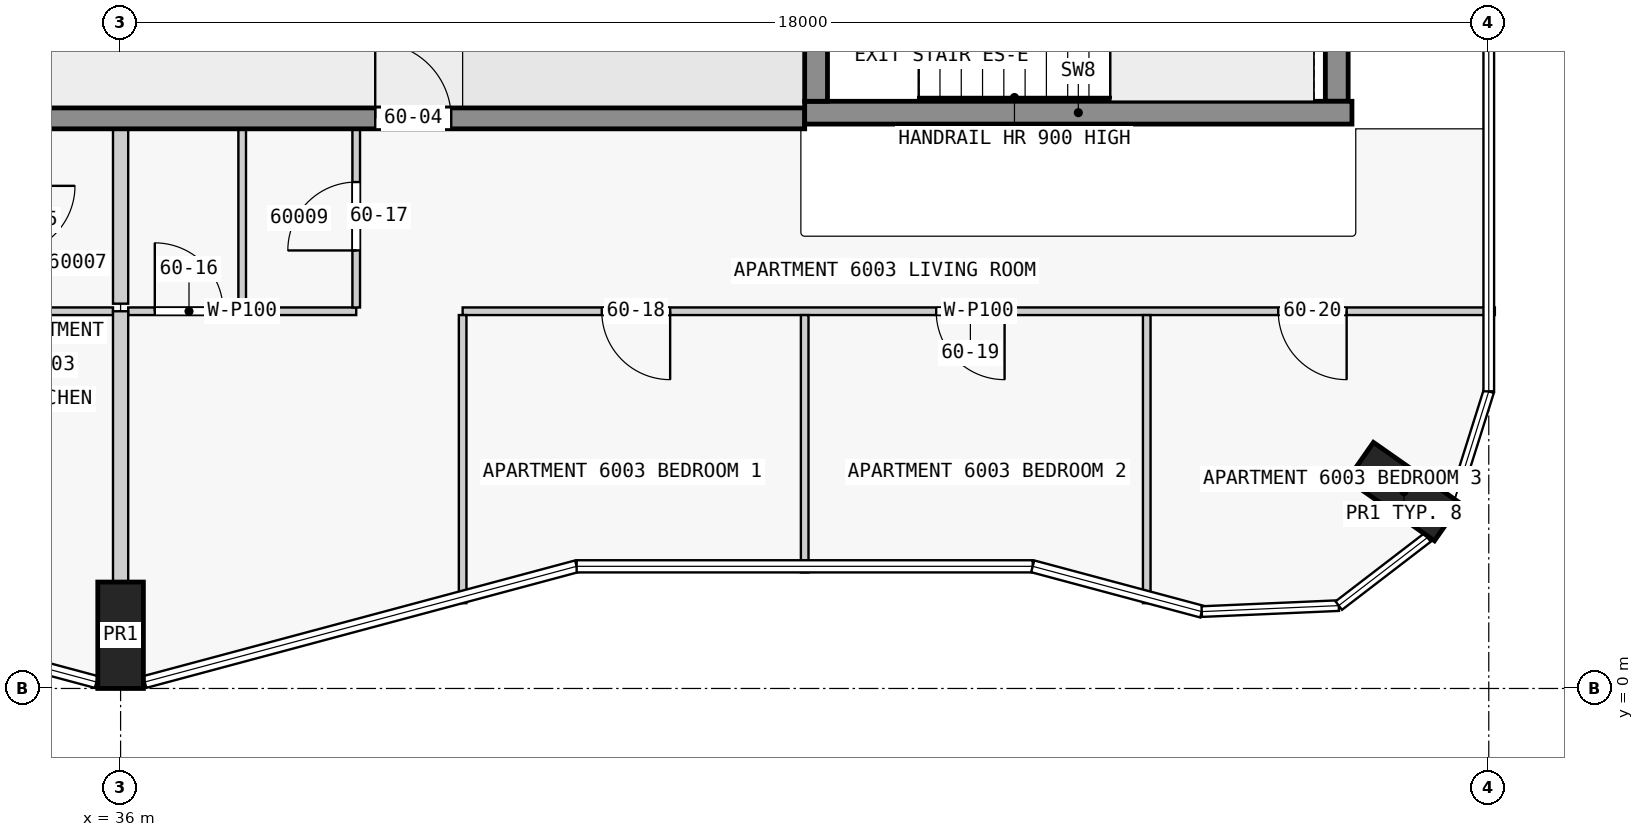
"""IFC4 building model, lengths in metres.
Left out: names, types, materials, properties, quantities, classifications, styles, units other than length and angle.
Written with IfcOpenShell. Run it as: python <this file> out.ifc"""

import sys

from ifc_helpers import new_model, si_unit, direction, frame, frame_2d, origin, origin_2d, place, context, subcontext, project, spatial, rectangle, extrude, element, fill, save


model = new_model("IFC4")
c1 = context("Model", 3, precision=1e-05, world=origin(), true_north=direction((0.0, 1.0)))
c2 = subcontext(c1, "Body", "Model", "MODEL_VIEW")
j1 = project(units=[si_unit("LENGTHUNIT", "METRE"), si_unit("PLANEANGLEUNIT", "RADIAN")], contexts=[c1])
p1 = place(None, origin())
s1 = spatial("IfcSite", under=j1, at=p1, CompositionType="ELEMENT")
p2 = place(p1, origin())
s2 = spatial("IfcBuilding", under=s1, at=p2, CompositionType="ELEMENT")
p3 = place(p2, frame((0.0, 0.0, 229.4)))
s3 = spatial("IfcBuildingStorey", under=s2, at=p3, CompositionType="ELEMENT", Elevation=229.4)
for number, where, z_axis, x_axis in (
    (1, (36.0, 0.7, 0.0), (0.0, 0.0, 1.0), (1.0, 0.0, 0.0)),
    (2, (52.884, 2.59, 0.0), (0.0, 0.0, 1.0), (0.574, 0.819, 0.0)),
):
    element("IfcColumn", number, at=place(p3, frame(where, z_axis=z_axis, x_axis=x_axis)), inside=s3, PredefinedType="COLUMN", context=c2, shape_type="SweptSolid", body=[
        extrude(rectangle(XDim=0.6, YDim=1.4, at=origin_2d()), origin(), (0.0, 0.0, 1.0), 3.5),
    ])
p4 = place(p3, frame((45.15, 7.725, 0.0), z_axis=(0.0, 0.0, 1.0), x_axis=(0.0, 1.0, 0.0)))
e3 = element("IfcWall", 3, at=p4, inside=s3, PredefinedType="SHEAR", context=c2, shape_type="SweptSolid", body=[
    extrude(rectangle(XDim=2.55, YDim=0.3, at=frame_2d((1.275, 0.0))), origin(), (0.0, 0.0, 1.0), 3.5),
])
p5 = place(p4, frame((0.725, 0.0, 0.0)))
e4 = element("IfcOpeningElement", 4, at=p5, cuts=e3, PredefinedType="OPENING", context=c2, shape_type="SweptSolid", body=[
    extrude(rectangle(XDim=1.1, YDim=2.1, at=frame_2d((0.55, 1.05))), frame((0.0, 0.16, 0.0), z_axis=(0.0, -1.0, 0.0), x_axis=(1.0, 0.0, 0.0)), (0.0, 0.0, 1.0), 0.32),
])
p6 = place(p3, frame((52.0, 7.725, 0.0), z_axis=(0.0, 0.0, 1.0), x_axis=(0.0, 1.0, 0.0)))
e5 = element("IfcWall", 5, at=p6, inside=s3, PredefinedType="SHEAR", context=c2, shape_type="SweptSolid", body=[
    extrude(rectangle(XDim=2.55, YDim=0.3, at=frame_2d((1.275, 0.0))), origin(), (0.0, 0.0, 1.0), 3.5),
])
p7 = place(p3, frame((45.0, 7.575, 0.0), z_axis=(0.0, 0.0, 1.0), x_axis=(1.0, 0.0, 0.0)))
e6 = element("IfcWall", 6, at=p7, inside=s3, PredefinedType="SHEAR", context=c2, shape_type="SweptSolid", body=[
    extrude(rectangle(XDim=7.2, YDim=0.3, at=frame_2d((3.6, 0.0))), origin(), (0.0, 0.0, 1.0), 3.5),
])
p8 = place(p3, frame((22.5, 7.5, 0.0), z_axis=(0.0, 0.0, 1.0), x_axis=(1.0, 0.0, 0.0)))
e7 = element("IfcWall", 7, at=p8, inside=s3, PredefinedType="SHEAR", context=c2, shape_type="SweptSolid", body=[
    extrude(rectangle(XDim=22.5, YDim=0.275, at=frame_2d((11.25, 0.0))), origin(), (0.0, 0.0, 1.0), 3.25),
])
p9 = place(p8, frame((1.75, 0.0, 0.0)))
e8 = element("IfcOpeningElement", 8, at=p9, cuts=e7, PredefinedType="OPENING", context=c2, shape_type="SweptSolid", body=[
    extrude(rectangle(XDim=1.0, YDim=2.1, at=frame_2d((0.5, 1.05))), frame((0.0, 0.147, 0.0), z_axis=(0.0, -1.0, 0.0), x_axis=(1.0, 0.0, 0.0)), (0.0, 0.0, 1.0), 0.295),
])
p10 = place(p8, frame((5.85, 0.0, 0.0)))
e9 = element("IfcOpeningElement", 9, at=p10, cuts=e7, PredefinedType="OPENING", context=c2, shape_type="SweptSolid", body=[
    extrude(rectangle(XDim=1.8, YDim=2.1, at=frame_2d((0.9, 1.05))), frame((0.0, 0.147, 0.0), z_axis=(0.0, -1.0, 0.0), x_axis=(1.0, 0.0, 0.0)), (0.0, 0.0, 1.0), 0.295),
])
p11 = place(p8, frame((10.75, 0.0, 0.0)))
e10 = element("IfcOpeningElement", 10, at=p11, cuts=e7, PredefinedType="OPENING", context=c2, shape_type="SweptSolid", body=[
    extrude(rectangle(XDim=1.0, YDim=2.1, at=frame_2d((0.5, 1.05))), frame((0.0, 0.147, 0.0), z_axis=(0.0, -1.0, 0.0), x_axis=(1.0, 0.0, 0.0)), (0.0, 0.0, 1.0), 0.295),
])
p12 = place(p8, frame((16.85, 0.0, 0.0)))
e11 = element("IfcOpeningElement", 11, at=p12, cuts=e7, PredefinedType="OPENING", context=c2, shape_type="SweptSolid", body=[
    extrude(rectangle(XDim=1.0, YDim=2.1, at=frame_2d((0.5, 1.05))), frame((0.0, 0.147, 0.0), z_axis=(0.0, -1.0, 0.0), x_axis=(1.0, 0.0, 0.0)), (0.0, 0.0, 1.0), 0.295),
])
p13 = place(p3, frame((54.08, 4.962, 0.0), z_axis=(0.0, 0.0, 1.0), x_axis=(-1.0, 0.0, 0.0)))
e12 = element("IfcWall", 12, at=p13, inside=s3, PredefinedType="PARTITIONING", context=c2, shape_type="SweptSolid", body=[
    extrude(rectangle(XDim=13.58, YDim=0.1, at=frame_2d((6.79, 0.0))), origin(), (0.0, 0.0, 1.0), 3.25),
])
p14 = place(p13, frame((10.85, 0.0, 0.0)))
e13 = element("IfcOpeningElement", 13, at=p14, cuts=e12, PredefinedType="OPENING", context=c2, shape_type="SweptSolid", body=[
    extrude(rectangle(XDim=0.9, YDim=2.1, at=frame_2d((0.45, 1.05))), frame((0.0, 0.06, 0.0), z_axis=(0.0, -1.0, 0.0), x_axis=(1.0, 0.0, 0.0)), (0.0, 0.0, 1.0), 0.12),
])
p15 = place(p13, frame((6.45, 0.0, 0.0)))
e14 = element("IfcOpeningElement", 14, at=p15, cuts=e12, PredefinedType="OPENING", context=c2, shape_type="SweptSolid", body=[
    extrude(rectangle(XDim=0.9, YDim=2.1, at=frame_2d((0.45, 1.05))), frame((0.0, 0.06, 0.0), z_axis=(0.0, -1.0, 0.0), x_axis=(1.0, 0.0, 0.0)), (0.0, 0.0, 1.0), 0.12),
])
p16 = place(p13, frame((1.95, 0.0, 0.0)))
e15 = element("IfcOpeningElement", 15, at=p16, cuts=e12, PredefinedType="OPENING", context=c2, shape_type="SweptSolid", body=[
    extrude(rectangle(XDim=0.9, YDim=2.1, at=frame_2d((0.45, 1.05))), frame((0.0, 0.06, 0.0), z_axis=(0.0, -1.0, 0.0), x_axis=(1.0, 0.0, 0.0)), (0.0, 0.0, 1.0), 0.12),
])
p17 = place(p3, frame((34.5, 4.962, 0.0), z_axis=(0.0, 0.0, 1.0), x_axis=(1.0, 0.0, 0.0)))
e16 = element("IfcWall", 16, at=p17, inside=s3, PredefinedType="PARTITIONING", context=c2, shape_type="SweptSolid", body=[
    extrude(rectangle(XDim=1.4, YDim=0.1, at=frame_2d((0.7, 0.0))), origin(), (0.0, 0.0, 1.0), 3.25),
])
p18 = place(p3, frame((36.1, 4.962, 0.0), z_axis=(0.0, 0.0, 1.0), x_axis=(1.0, 0.0, 0.0)))
e17 = element("IfcWall", 17, at=p18, inside=s3, PredefinedType="PARTITIONING", context=c2, shape_type="SweptSolid", body=[
    extrude(rectangle(XDim=3.0, YDim=0.1, at=frame_2d((1.5, 0.0))), origin(), (0.0, 0.0, 1.0), 3.25),
])
p19 = place(p18, frame((0.35, 0.0, 0.0)))
e18 = element("IfcOpeningElement", 18, at=p19, cuts=e17, PredefinedType="OPENING", context=c2, shape_type="SweptSolid", body=[
    extrude(rectangle(XDim=0.9, YDim=2.1, at=frame_2d((0.45, 1.05))), frame((0.0, 0.06, 0.0), z_axis=(0.0, -1.0, 0.0), x_axis=(1.0, 0.0, 0.0)), (0.0, 0.0, 1.0), 0.12),
])
p20 = place(p3, frame((36.0, 4.962, 0.0), z_axis=(0.0, 0.0, 1.0), x_axis=(0.0, -1.0, 0.0)))
e19 = element("IfcWall", 19, at=p20, inside=s3, PredefinedType="PARTITIONING", context=c2, shape_type="SweptSolid", body=[
    extrude(rectangle(XDim=3.562, YDim=0.2, at=frame_2d((1.781, 0.0))), origin(), (0.0, 0.0, 1.0), 3.25),
])
p21 = place(p3, frame((36.0, 5.062, 0.0), z_axis=(0.0, 0.0, 1.0), x_axis=(0.0, 1.0, 0.0)))
e20 = element("IfcWall", 20, at=p21, inside=s3, PredefinedType="PARTITIONING", context=c2, shape_type="SweptSolid", body=[
    extrude(rectangle(XDim=2.3, YDim=0.2, at=frame_2d((1.15, 0.0))), origin(), (0.0, 0.0, 1.0), 3.25),
])
p22 = place(p3, frame((37.6, 5.012, 0.0), z_axis=(0.0, 0.0, 1.0), x_axis=(0.0, 1.0, 0.0)))
e21 = element("IfcWall", 21, at=p22, inside=s3, PredefinedType="PARTITIONING", context=c2, shape_type="SweptSolid", body=[
    extrude(rectangle(XDim=2.35, YDim=0.1, at=frame_2d((1.175, 0.0))), origin(), (0.0, 0.0, 1.0), 3.25),
])
p23 = place(p3, frame((39.1, 5.012, 0.0), z_axis=(0.0, 0.0, 1.0), x_axis=(0.0, 1.0, 0.0)))
e22 = element("IfcWall", 22, at=p23, inside=s3, PredefinedType="PARTITIONING", context=c2, shape_type="SweptSolid", body=[
    extrude(rectangle(XDim=2.35, YDim=0.1, at=frame_2d((1.175, 0.0))), origin(), (0.0, 0.0, 1.0), 3.25),
])
p24 = place(p23, frame((0.75, 0.0, 0.0)))
e23 = element("IfcOpeningElement", 23, at=p24, cuts=e22, PredefinedType="OPENING", context=c2, shape_type="SweptSolid", body=[
    extrude(rectangle(XDim=0.9, YDim=2.1, at=frame_2d((0.45, 1.05))), frame((0.0, 0.06, 0.0), z_axis=(0.0, -1.0, 0.0), x_axis=(1.0, 0.0, 0.0)), (0.0, 0.0, 1.0), 0.12),
])
p25 = place(p3, frame((40.5, 4.913, 0.0), z_axis=(0.0, 0.0, 1.0), x_axis=(0.0, -1.0, 0.0)))
e24 = element("IfcWall", 24, at=p25, inside=s3, PredefinedType="PARTITIONING", context=c2, shape_type="SweptSolid", body=[
    extrude(rectangle(XDim=3.79, YDim=0.1, at=frame_2d((1.895, 0.0))), origin(), (0.0, 0.0, 1.0), 3.25),
])
p26 = place(p3, frame((45.0, 1.527, 0.0), z_axis=(0.0, 0.0, 1.0), x_axis=(0.0, 1.0, 0.0)))
e25 = element("IfcWall", 25, at=p26, inside=s3, PredefinedType="PARTITIONING", context=c2, shape_type="SweptSolid", body=[
    extrude(rectangle(XDim=3.386, YDim=0.1, at=frame_2d((1.693, 0.0))), origin(), (0.0, 0.0, 1.0), 3.25),
])
p27 = place(p3, frame((49.5, 1.122, 0.0), z_axis=(0.0, 0.0, 1.0), x_axis=(0.0, 1.0, 0.0)))
e26 = element("IfcWall", 26, at=p27, inside=s3, PredefinedType="PARTITIONING", context=c2, shape_type="SweptSolid", body=[
    extrude(rectangle(XDim=3.79, YDim=0.1, at=frame_2d((1.895, 0.0))), origin(), (0.0, 0.0, 1.0), 3.25),
])
p28 = place(p12, origin())
e27 = element("IfcDoor", 27, at=p28, inside=s3, OperationType="SINGLE_SWING_RIGHT", PredefinedType="DOOR", context=c2, shape_type="SweptSolid", body=[
    extrude(rectangle(XDim=1.0, YDim=2.1, at=frame_2d((0.5, 1.05))), frame((0.0, 0.025, 0.0), z_axis=(0.0, -1.0, 0.0), x_axis=(1.0, 0.0, 0.0)), (0.0, 0.0, 1.0), 0.05),
])
fill(e11, e27)
p29 = place(p19, origin())
e28 = element("IfcDoor", 28, at=p29, inside=s3, OperationType="SINGLE_SWING_LEFT", PredefinedType="DOOR", context=c2, shape_type="SweptSolid", body=[
    extrude(rectangle(XDim=0.9, YDim=2.1, at=frame_2d((0.45, 1.05))), frame((0.0, 0.025, 0.0), z_axis=(0.0, -1.0, 0.0), x_axis=(1.0, 0.0, 0.0)), (0.0, 0.0, 1.0), 0.05),
])
fill(e18, e28)
p30 = place(p24, origin())
e29 = element("IfcDoor", 29, at=p30, inside=s3, OperationType="SINGLE_SWING_RIGHT", PredefinedType="DOOR", context=c2, shape_type="SweptSolid", body=[
    extrude(rectangle(XDim=0.9, YDim=2.1, at=frame_2d((0.45, 1.05))), frame((0.0, 0.025, 0.0), z_axis=(0.0, -1.0, 0.0), x_axis=(1.0, 0.0, 0.0)), (0.0, 0.0, 1.0), 0.05),
])
fill(e23, e29)
p31 = place(p14, origin())
e30 = element("IfcDoor", 30, at=p31, inside=s3, OperationType="SINGLE_SWING_RIGHT", PredefinedType="DOOR", context=c2, shape_type="SweptSolid", body=[
    extrude(rectangle(XDim=0.9, YDim=2.1, at=frame_2d((0.45, 1.05))), frame((0.0, 0.025, 0.0), z_axis=(0.0, -1.0, 0.0), x_axis=(1.0, 0.0, 0.0)), (0.0, 0.0, 1.0), 0.05),
])
fill(e13, e30)
p32 = place(p15, origin())
e31 = element("IfcDoor", 31, at=p32, inside=s3, OperationType="SINGLE_SWING_RIGHT", PredefinedType="DOOR", context=c2, shape_type="SweptSolid", body=[
    extrude(rectangle(XDim=0.9, YDim=2.1, at=frame_2d((0.45, 1.05))), frame((0.0, 0.025, 0.0), z_axis=(0.0, -1.0, 0.0), x_axis=(1.0, 0.0, 0.0)), (0.0, 0.0, 1.0), 0.05),
])
fill(e14, e31)
p33 = place(p16, origin())
e32 = element("IfcDoor", 32, at=p33, inside=s3, OperationType="SINGLE_SWING_LEFT", PredefinedType="DOOR", context=c2, shape_type="SweptSolid", body=[
    extrude(rectangle(XDim=0.9, YDim=2.1, at=frame_2d((0.45, 1.05))), frame((0.0, 0.025, 0.0), z_axis=(0.0, -1.0, 0.0), x_axis=(1.0, 0.0, 0.0)), (0.0, 0.0, 1.0), 0.05),
])
fill(e15, e32)
save(model, sys.argv[1])
